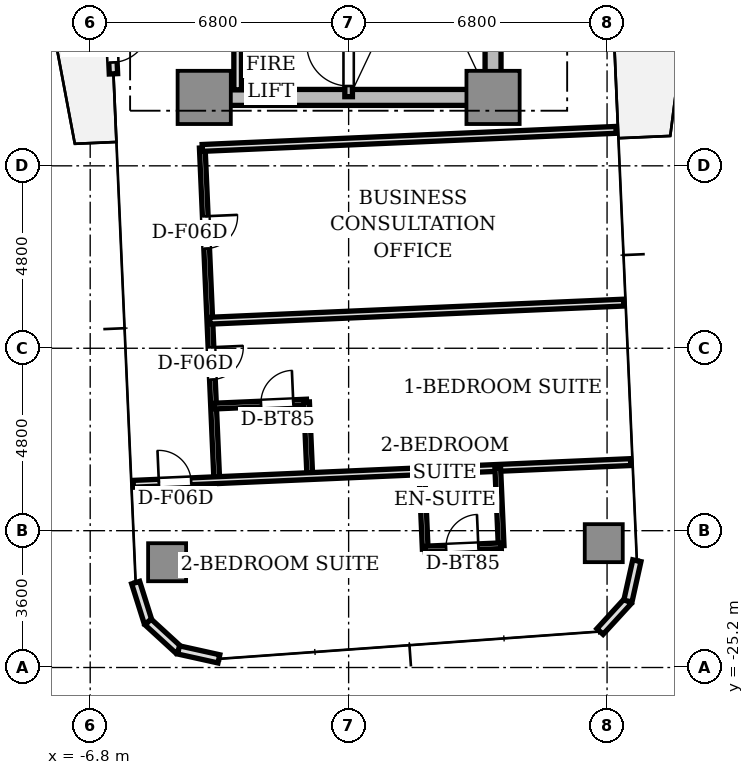
"""IFC4 building model, lengths in metres.
Left out: names, types, materials, properties, quantities, classifications, styles, units other than length and angle.
Written with IfcOpenShell. Run it as: python <this file> out.ifc"""

import sys

from ifc_helpers import new_model, si_unit, direction, frame, frame_2d, origin, origin_2d, place, context, subcontext, project, spatial, rectangle, extrude, source, transform, mapped, element, fill, save


model = new_model("IFC4")
c1 = context("Model", 3, precision=1e-05, world=origin(), true_north=direction((0.0, 1.0)))
c2 = subcontext(c1, "Body", "Model", "MODEL_VIEW")
j1 = project(units=[si_unit("LENGTHUNIT", "METRE"), si_unit("PLANEANGLEUNIT", "RADIAN")], contexts=[c1])
p1 = place(None, origin())
s1 = spatial("IfcSite", under=j1, at=p1, CompositionType="ELEMENT")
p2 = place(p1, origin())
s2 = spatial("IfcBuilding", under=s1, at=p2, CompositionType="ELEMENT")
p3 = place(p2, frame((0.0, 0.0, 86.85)))
s3 = spatial("IfcBuildingStorey", under=s2, at=p3, CompositionType="ELEMENT", Elevation=86.85)
p4 = place(p3, frame((-3.55, -10.2, 0.0), z_axis=(0.0, 0.0, 1.0), x_axis=(1.0, 0.0, 0.0)))
e1 = element("IfcWall", 1, at=p4, inside=s3, PredefinedType="SHEAR", context=c2, shape_type="SweptSolid", body=[
    extrude(rectangle(XDim=7.1, YDim=0.42, at=frame_2d((3.55, 0.0))), origin(), (0.0, 0.0, 1.0), 3.11),
])
p5 = place(p3, frame((3.8, -9.75, 0.0), z_axis=(0.0, 0.0, 1.0), x_axis=(0.0, 1.0, 0.0)))
e2 = element("IfcWall", 2, at=p5, inside=s3, PredefinedType="SHEAR", context=c2, shape_type="SweptSolid", body=[
    extrude(rectangle(XDim=6.9, YDim=0.42, at=frame_2d((3.45, 0.0))), origin(), (0.0, 0.0, 1.0), 3.11),
])
m1 = source(origin(), c2, "Body", "SweptSolid", [
    extrude(rectangle(XDim=1.4, YDim=1.4, at=origin_2d()), origin(), (0.0, 0.0, 1.0), 3.11),
])
for number, where, z_axis, x_axis in (
    (3, (-3.8, -10.2, 0.0), (0.0, 0.0, 1.0), (1.0, 0.0, 0.0)),
    (4, (3.8, -10.2, 0.0), (0.0, 0.0, 1.0), (1.0, 0.0, 0.0)),
):
    element("IfcColumn", number, at=place(p3, frame(where, z_axis=z_axis, x_axis=x_axis)), inside=s3, PredefinedType="COLUMN", context=c2, shape_type="MappedRepresentation", body=[
        mapped(m1, transform((0.0, 0.0, 0.0), scale=1.0)),
    ])
m2 = source(origin(), c2, "Body", "SweptSolid", [
    extrude(rectangle(XDim=1.0, YDim=1.0, at=origin_2d()), origin(), (0.0, 0.0, 1.0), 3.11),
])
for number, where, z_axis, x_axis in (
    (5, (-4.776, -22.43, 0.0), (0.0, 0.0, 1.0), (1.0, 0.0, 0.0)),
    (6, (6.713, -21.928, 0.0), (0.0, 0.0, 1.0), (1.0, 0.0, 0.0)),
):
    element("IfcColumn", number, at=place(p3, frame(where, z_axis=z_axis, x_axis=x_axis)), inside=s3, PredefinedType="COLUMN", context=c2, shape_type="MappedRepresentation", body=[
        mapped(m2, transform((0.0, 0.0, 0.0), scale=1.0)),
    ])
p6 = place(p3, frame((-6.306, -6.882, 0.0), z_axis=(0.0, 0.0, 1.0), x_axis=(0.043672655174, -0.999045894436, 0.0)))
e7 = element("IfcWall", 7, at=p6, inside=s3, PredefinedType="STANDARD", context=c2, shape_type="SweptSolid", body=[
    extrude(rectangle(XDim=2.7, YDim=0.22, at=frame_2d((1.35, 0.0))), origin(), (0.0, 0.0, 1.0), 3.11),
])
p7 = place(p6, frame((1.4, 0.0, 0.0)))
e8 = element("IfcOpeningElement", 8, at=p7, cuts=e7, PredefinedType="OPENING", context=c2, shape_type="SweptSolid", body=[
    extrude(rectangle(XDim=1.0, YDim=2.2, at=frame_2d((0.5, 1.1))), frame((0.0, 0.12, 0.0), z_axis=(0.0, -1.0, 0.0), x_axis=(1.0, 0.0, 0.0)), (0.0, 0.0, 1.0), 0.24),
])
p8 = place(p3, frame((-5.604, -22.966, 0.0), z_axis=(0.0, 0.0, 1.0), x_axis=(0.300755105707, -0.953701403161, 0.0)))
e9 = element("IfcWall", 9, at=p8, inside=s3, PredefinedType="STANDARD", context=c2, shape_type="SweptSolid", body=[
    extrude(rectangle(XDim=1.087, YDim=0.22, at=frame_2d((0.543, 0.0))), origin(), (0.0, 0.0, 1.0), 3.11),
])
p9 = place(p3, frame((-5.277, -24.003, 0.0), z_axis=(0.0, 0.0, 1.0), x_axis=(0.737312600672, -0.675551721847, 0.0)))
e10 = element("IfcWall", 10, at=p9, inside=s3, PredefinedType="STANDARD", context=c2, shape_type="SweptSolid", body=[
    extrude(rectangle(XDim=1.087, YDim=0.22, at=frame_2d((0.543, 0.0))), origin(), (0.0, 0.0, 1.0), 3.11),
])
for number, where, z_axis, x_axis in (
    (11, (-4.475, -24.737, 0.0), (0.0, 0.0, 1.0), (0.976, -0.217, 0.0)),
    (12, (6.614, -24.253, 0.0), (0.0, 0.0, 1.0), (0.676, 0.737, 0.0)),
):
    element("IfcWall", number, at=place(p3, frame(where, z_axis=z_axis, x_axis=x_axis)), inside=s3, PredefinedType="STANDARD", context=c2, shape_type="SweptSolid", body=[
        extrude(rectangle(XDim=1.087, YDim=0.22, at=frame_2d((0.543, 0.0))), origin(), (0.0, 0.0, 1.0), 3.11),
    ])
p10 = place(p3, frame((7.349, -23.452, 0.0), z_axis=(0.0, 0.0, 1.0), x_axis=(0.216454939174, 0.976292609471, 0.0)))
e13 = element("IfcWall", 13, at=p10, inside=s3, PredefinedType="STANDARD", context=c2, shape_type="SweptSolid", body=[
    extrude(rectangle(XDim=1.087, YDim=0.22, at=frame_2d((0.544, 0.0))), origin(), (0.0, 0.0, 1.0), 3.11),
])
p11 = place(p3, frame((0.0, -10.18, 0.0), z_axis=(0.0, 0.0, 1.0), x_axis=(0.0, 1.0, 0.0)))
e14 = element("IfcWall", 14, at=p11, inside=s3, PredefinedType="SOLIDWALL", context=c2, shape_type="SweptSolid", body=[
    extrude(rectangle(XDim=7.68, YDim=0.2, at=frame_2d((3.84, 0.0))), origin(), (0.0, 0.0, 1.0), 3.11),
])
p12 = place(p11, frame((0.28, 0.0, 0.0)))
e15 = element("IfcOpeningElement", 15, at=p12, cuts=e14, PredefinedType="OPENING", context=c2, shape_type="SweptSolid", body=[
    extrude(rectangle(XDim=1.1, YDim=2.15, at=frame_2d((0.55, 1.075))), frame((0.0, 0.11, 0.0), z_axis=(0.0, -1.0, 0.0), x_axis=(1.0, 0.0, 0.0)), (0.0, 0.0, 1.0), 0.22),
])
p13 = place(p3, frame((-2.92, -10.0, 0.0), z_axis=(0.0, 0.0, 1.0), x_axis=(0.0, 1.0, 0.0)))
e16 = element("IfcWall", 16, at=p13, inside=s3, PredefinedType="SOLIDWALL", context=c2, shape_type="SweptSolid", body=[
    extrude(rectangle(XDim=1.44, YDim=0.2, at=frame_2d((0.72, 0.0))), origin(), (0.0, 0.0, 1.0), 2.66),
])
p14 = place(p3, frame((-3.851, -11.529, 0.0), z_axis=(0.0, 0.0, 1.0), x_axis=(0.043638220751, -0.999047399121, 0.0)))
e17 = element("IfcWall", 17, at=p14, inside=s3, PredefinedType="PARTITIONING", context=c2, shape_type="SweptSolid", body=[
    extrude(rectangle(XDim=8.75, YDim=0.15, at=frame_2d((4.375, 0.0))), origin(), (0.0, 0.0, 1.0), 2.63),
])
p15 = place(p14, frame((1.8, 0.0, 0.0)))
e18 = element("IfcOpeningElement", 18, at=p15, cuts=e17, PredefinedType="OPENING", context=c2, shape_type="SweptSolid", body=[
    extrude(rectangle(XDim=0.85, YDim=2.1, at=frame_2d((0.425, 1.05))), frame((0.0, 0.085, 0.0), z_axis=(0.0, -1.0, 0.0), x_axis=(1.0, 0.0, 0.0)), (0.0, 0.0, 1.0), 0.17),
])
p16 = place(p14, frame((5.25, 0.0, 0.0)))
e19 = element("IfcOpeningElement", 19, at=p16, cuts=e17, PredefinedType="OPENING", context=c2, shape_type="SweptSolid", body=[
    extrude(rectangle(XDim=0.85, YDim=2.1, at=frame_2d((0.425, 1.05))), frame((0.0, 0.085, 0.0), z_axis=(0.0, -1.0, 0.0), x_axis=(1.0, 0.0, 0.0)), (0.0, 0.0, 1.0), 0.17),
])
p17 = place(p3, frame((-3.851, -11.529, 0.0), z_axis=(0.0, 0.0, 1.0), x_axis=(0.999048663393, 0.043609267053, 0.0)))
e20 = element("IfcWall", 20, at=p17, inside=s3, PredefinedType="PARTITIONING", context=c2, shape_type="SweptSolid", body=[
    extrude(rectangle(XDim=10.9, YDim=0.18, at=frame_2d((5.45, 0.0))), origin(), (0.0, 0.0, 1.0), 2.66),
])
p18 = place(p3, frame((-3.652, -16.075, 0.0), z_axis=(0.0, 0.0, 1.0), x_axis=(0.999047687305, 0.043631622609, 0.0)))
e21 = element("IfcWall", 21, at=p18, inside=s3, PredefinedType="PARTITIONING", context=c2, shape_type="SweptSolid", body=[
    extrude(rectangle(XDim=10.9, YDim=0.18, at=frame_2d((5.45, 0.0))), origin(), (0.0, 0.0, 1.0), 2.66),
])
p19 = place(p3, frame((-3.554, -18.323, 0.0), z_axis=(0.0, 0.0, 1.0), x_axis=(0.999047112283, 0.043644787072, 0.0)))
e22 = element("IfcWall", 22, at=p19, inside=s3, PredefinedType="PARTITIONING", context=c2, shape_type="SweptSolid", body=[
    extrude(rectangle(XDim=2.45, YDim=0.15, at=frame_2d((1.225, 0.0))), origin(), (0.0, 0.0, 1.0), 2.66),
])
p20 = place(p19, frame((1.25, 0.0, 0.0)))
e23 = element("IfcOpeningElement", 23, at=p20, cuts=e22, PredefinedType="OPENING", context=c2, shape_type="SweptSolid", body=[
    extrude(rectangle(XDim=0.85, YDim=2.1, at=frame_2d((0.425, 1.05))), frame((0.0, 0.085, 0.0), z_axis=(0.0, -1.0, 0.0), x_axis=(1.0, 0.0, 0.0)), (0.0, 0.0, 1.0), 0.17),
])
p21 = place(p3, frame((-1.106, -18.216, 0.0), z_axis=(0.0, 0.0, 1.0), x_axis=(0.043567614947, -0.99905048067, 0.0)))
e24 = element("IfcWall", 24, at=p21, inside=s3, PredefinedType="PARTITIONING", context=c2, shape_type="SweptSolid", body=[
    extrude(rectangle(XDim=1.95, YDim=0.15, at=frame_2d((0.975, 0.0))), origin(), (0.0, 0.0, 1.0), 2.66),
])
p22 = place(p3, frame((-5.667, -20.367, 0.0), z_axis=(0.0, 0.0, 1.0), x_axis=(0.999047806124, 0.043628901879, 0.0)))
e25 = element("IfcWall", 25, at=p22, inside=s3, PredefinedType="PARTITIONING", context=c2, shape_type="SweptSolid", body=[
    extrude(rectangle(XDim=13.1, YDim=0.18, at=frame_2d((6.55, 0.0))), origin(), (0.0, 0.0, 1.0), 2.66),
])
p23 = place(p22, frame((0.675, 0.0, 0.0)))
e26 = element("IfcOpeningElement", 26, at=p23, cuts=e25, PredefinedType="OPENING", context=c2, shape_type="SweptSolid", body=[
    extrude(rectangle(XDim=0.85, YDim=2.1, at=frame_2d((0.425, 1.05))), frame((0.0, 0.1, 0.0), z_axis=(0.0, -1.0, 0.0), x_axis=(1.0, 0.0, 0.0)), (0.0, 0.0, 1.0), 0.2),
])
p24 = place(p3, frame((3.924, -19.948, 0.0), z_axis=(0.0, 0.0, 1.0), x_axis=(0.043587097972, -0.999049630844, 0.0)))
e27 = element("IfcWall", 27, at=p24, inside=s3, PredefinedType="PARTITIONING", context=c2, shape_type="SweptSolid", body=[
    extrude(rectangle(XDim=2.05, YDim=0.15, at=frame_2d((1.025, 0.0))), origin(), (0.0, 0.0, 1.0), 2.66),
])
p25 = place(p3, frame((1.926, -20.035, 0.0), z_axis=(0.0, 0.0, 1.0), x_axis=(0.043592284462, -0.999049404552, 0.0)))
e28 = element("IfcWall", 28, at=p25, inside=s3, PredefinedType="PARTITIONING", context=c2, shape_type="SweptSolid", body=[
    extrude(rectangle(XDim=2.05, YDim=0.15, at=frame_2d((1.025, 0.0))), origin(), (0.0, 0.0, 1.0), 2.66),
])
p26 = place(p3, frame((2.015, -22.083, 0.0), z_axis=(0.0, 0.0, 1.0), x_axis=(0.999049929275, 0.043580257179, 0.0)))
e29 = element("IfcWall", 29, at=p26, inside=s3, PredefinedType="PARTITIONING", context=c2, shape_type="SweptSolid", body=[
    extrude(rectangle(XDim=2.0, YDim=0.15, at=frame_2d((1.0, 0.0))), origin(), (0.0, 0.0, 1.0), 2.58),
])
p27 = place(p26, frame((0.55, 0.0, 0.0)))
e30 = element("IfcOpeningElement", 30, at=p27, cuts=e29, PredefinedType="OPENING", context=c2, shape_type="SweptSolid", body=[
    extrude(rectangle(XDim=0.85, YDim=2.1, at=frame_2d((0.425, 1.05))), frame((0.0, 0.085, 0.0), z_axis=(0.0, -1.0, 0.0), x_axis=(1.0, 0.0, 0.0)), (0.0, 0.0, 1.0), 0.17),
])
m3 = source(origin(), c2, "Body", "SweptSolid", [
    extrude(rectangle(XDim=1.0, YDim=0.05, at=origin_2d()), origin(), (0.0, 0.0, 1.0), 2.2),
])
p28 = place(p7, frame((0.5, 0.0, 0.0)))
e31 = element("IfcDoor", 31, at=p28, inside=s3, OperationType="SINGLE_SWING_LEFT", PredefinedType="DOOR", context=c2, shape_type="MappedRepresentation", body=[
    mapped(m3, transform((0.0, 0.0, 0.0), scale=1.0)),
])
fill(e8, e31)
m4 = source(origin(), c2, "Body", "SweptSolid", [
    extrude(rectangle(XDim=1.1, YDim=0.05, at=origin_2d()), origin(), (0.0, 0.0, 1.0), 2.15),
])
p29 = place(p12, frame((0.55, 0.0, 0.0)))
e32 = element("IfcDoor", 32, at=p29, inside=s3, OperationType="SINGLE_SWING_RIGHT", PredefinedType="DOOR", context=c2, shape_type="MappedRepresentation", body=[
    mapped(m4, transform((0.0, 0.0, 0.0), scale=1.0)),
])
fill(e15, e32)
m5 = source(origin(), c2, "Body", "SweptSolid", [
    extrude(rectangle(XDim=0.85, YDim=0.05, at=origin_2d()), origin(), (0.0, 0.0, 1.0), 2.1),
])
p30 = place(p15, frame((0.425, 0.0, 0.0)))
e33 = element("IfcDoor", 33, at=p30, inside=s3, OperationType="SINGLE_SWING_LEFT", PredefinedType="DOOR", context=c2, shape_type="MappedRepresentation", body=[
    mapped(m5, transform((0.0, 0.0, 0.0), scale=1.0)),
])
fill(e18, e33)
p31 = place(p20, frame((0.425, 0.0, 0.0)))
e34 = element("IfcDoor", 34, at=p31, inside=s3, OperationType="SINGLE_SWING_RIGHT", PredefinedType="DOOR", context=c2, shape_type="MappedRepresentation", body=[
    mapped(m5, transform((0.0, 0.0, 0.0), scale=1.0)),
])
fill(e23, e34)
p32 = place(p16, frame((0.425, 0.0, 0.0)))
e35 = element("IfcDoor", 35, at=p32, inside=s3, OperationType="SINGLE_SWING_LEFT", PredefinedType="DOOR", context=c2, shape_type="MappedRepresentation", body=[
    mapped(m5, transform((0.0, 0.0, 0.0), scale=1.0)),
])
fill(e19, e35)
p33 = place(p27, frame((0.425, 0.0, 0.0)))
e36 = element("IfcDoor", 36, at=p33, inside=s3, OperationType="SINGLE_SWING_RIGHT", PredefinedType="DOOR", context=c2, shape_type="MappedRepresentation", body=[
    mapped(m5, transform((0.0, 0.0, 0.0), scale=1.0)),
])
fill(e30, e36)
p34 = place(p23, frame((0.425, 0.0, 0.0)))
e37 = element("IfcDoor", 37, at=p34, inside=s3, OperationType="SINGLE_SWING_LEFT", PredefinedType="DOOR", context=c2, shape_type="MappedRepresentation", body=[
    mapped(m5, transform((0.0, 0.0, 0.0), scale=1.0)),
])
fill(e26, e37)
save(model, sys.argv[1])
